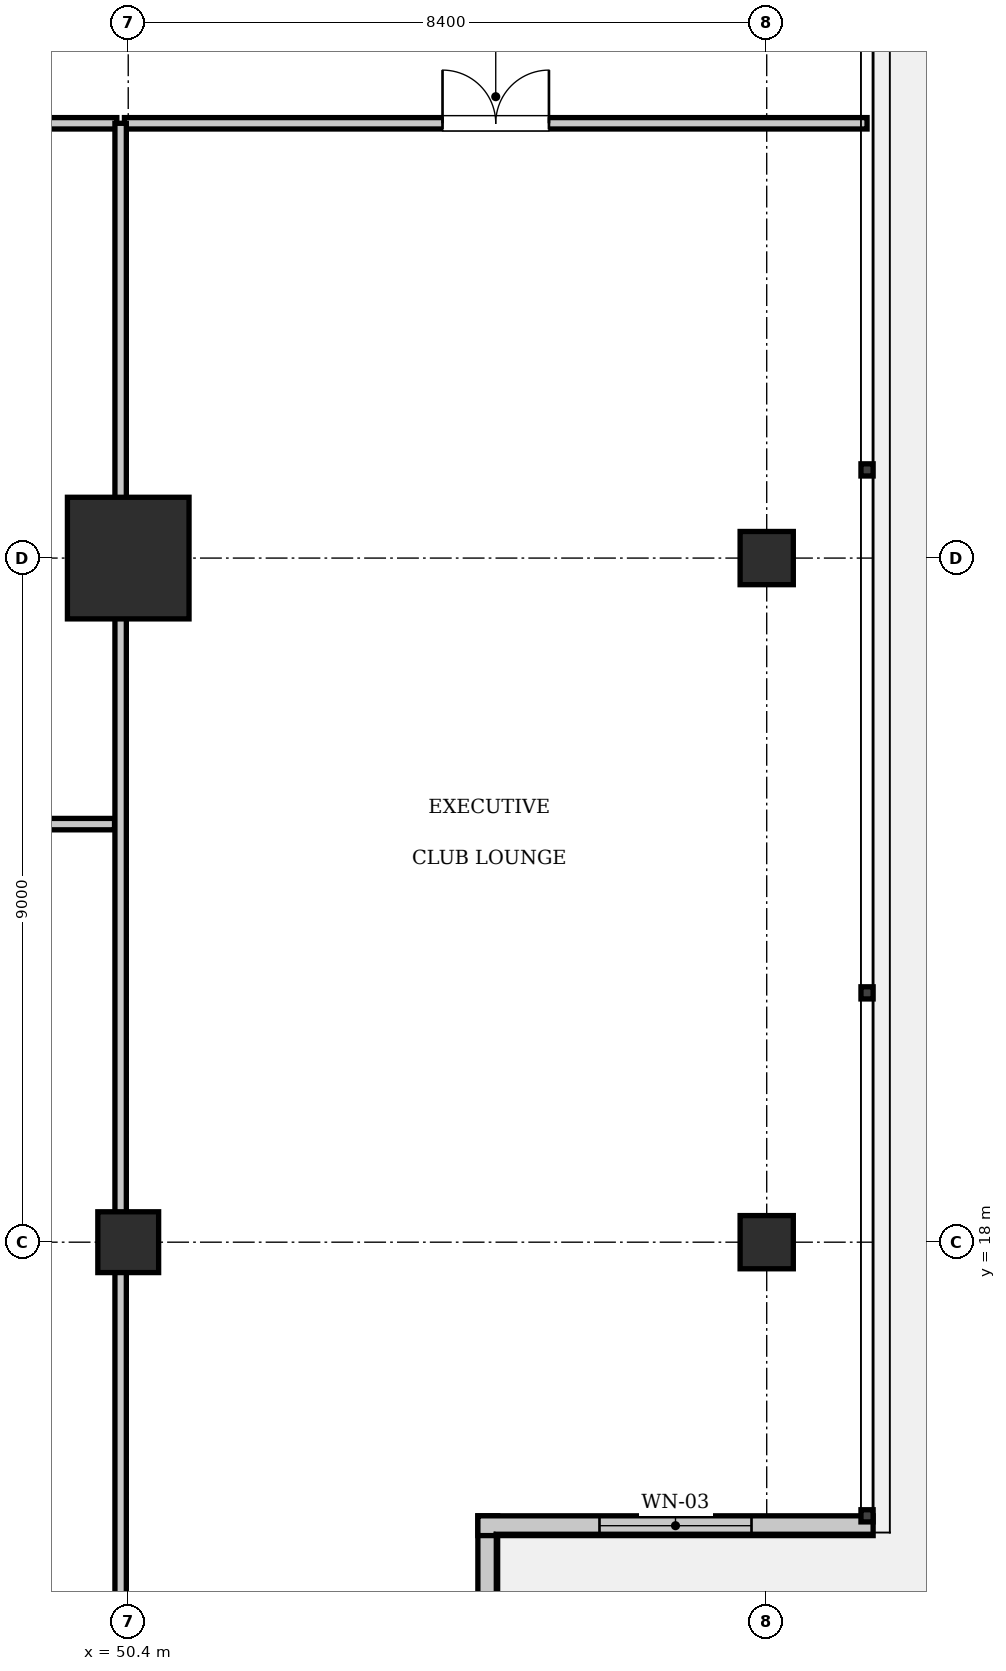
"""IFC4 building model, lengths in metres.
Left out: names, types, materials, properties, quantities, classifications, styles, units other than length and angle.
Written with IfcOpenShell. Run it as: python <this file> out.ifc"""

import sys

from ifc_helpers import new_model, si_unit, direction, frame, frame_2d, origin, origin_2d, place, context, subcontext, project, spatial, rectangle, extrude, element, fill, save


model = new_model("IFC4")
c1 = context("Model", 3, precision=1e-05, world=origin(), true_north=direction((0.0, 1.0)))
c2 = subcontext(c1, "Body", "Model", "MODEL_VIEW")
j1 = project(units=[si_unit("LENGTHUNIT", "METRE"), si_unit("PLANEANGLEUNIT", "RADIAN")], contexts=[c1])
p1 = place(None, origin())
s1 = spatial("IfcSite", under=j1, at=p1, CompositionType="ELEMENT")
p2 = place(p1, origin())
s2 = spatial("IfcBuilding", under=s1, at=p2, CompositionType="ELEMENT")
p3 = place(p2, frame((0.0, 0.0, 234.5)))
s3 = spatial("IfcBuildingStorey", under=s2, at=p3, CompositionType="ELEMENT", Elevation=234.5)
p4 = place(p3, frame((50.4, 27.0, 0.0), z_axis=(0.0, 0.0, 1.0), x_axis=(1.0, 0.0, 0.0)))
e1 = element("IfcColumn", 1, at=p4, inside=s3, PredefinedType="COLUMN", context=c2, shape_type="SweptSolid", body=[
    extrude(rectangle(XDim=1.6, YDim=1.6, at=origin_2d()), origin(), (0.0, 0.0, 1.0), 4.9),
])
p5 = place(p3, frame((50.4, 18.0, 0.0), z_axis=(0.0, 0.0, 1.0), x_axis=(1.0, 0.0, 0.0)))
e2 = element("IfcColumn", 2, at=p5, inside=s3, PredefinedType="COLUMN", context=c2, shape_type="SweptSolid", body=[
    extrude(rectangle(XDim=0.8, YDim=0.8, at=origin_2d()), origin(), (0.0, 0.0, 1.0), 4.9),
])
for number, where, z_axis, x_axis in (
    (3, (58.8, 18.0, 0.0), (0.0, 0.0, 1.0), (1.0, 0.0, 0.0)),
    (4, (58.8, 27.0, 0.0), (0.0, 0.0, 1.0), (1.0, 0.0, 0.0)),
):
    element("IfcColumn", number, at=place(p3, frame(where, z_axis=z_axis, x_axis=x_axis)), inside=s3, PredefinedType="COLUMN", context=c2, shape_type="SweptSolid", body=[
        extrude(rectangle(XDim=0.7, YDim=0.7, at=origin_2d()), origin(), (0.0, 0.0, 1.0), 4.9),
    ])
p6 = place(p3, frame((55.13, 14.4, 0.0), z_axis=(0.0, 0.0, 1.0), x_axis=(0.0, -1.0, 0.0)))
e5 = element("IfcWall", 5, at=p6, inside=s3, PredefinedType="SOLIDWALL", context=c2, shape_type="SweptSolid", body=[
    extrude(rectangle(XDim=5.2, YDim=0.26, at=frame_2d((2.6, 0.0))), origin(), (0.0, 0.0, 1.0), 4.66),
])
p7 = place(p3, frame((60.2, 14.27, 0.0), z_axis=(0.0, 0.0, 1.0), x_axis=(-1.0, 0.0, 0.0)))
e6 = element("IfcWall", 6, at=p7, inside=s3, PredefinedType="SOLIDWALL", context=c2, shape_type="SweptSolid", body=[
    extrude(rectangle(XDim=5.2, YDim=0.26, at=frame_2d((2.6, 0.0))), origin(), (0.0, 0.0, 1.0), 4.66),
])
p8 = place(p7, frame((1.6, 0.0, 0.9)))
e7 = element("IfcOpeningElement", 7, at=p8, cuts=e6, PredefinedType="OPENING", context=c2, shape_type="SweptSolid", body=[
    extrude(rectangle(XDim=2.0, YDim=2.2, at=frame_2d((1.0, 1.1))), frame((0.0, 0.14, 0.0), z_axis=(0.0, -1.0, 0.0), x_axis=(1.0, 0.0, 0.0)), (0.0, 0.0, 1.0), 0.28),
])
p9 = place(p3, frame((35.56, 23.5, 0.0), z_axis=(0.0, 0.0, 1.0), x_axis=(1.0, 0.0, 0.0)))
e8 = element("IfcWall", 8, at=p9, inside=s3, PredefinedType="PARTITIONING", context=c2, shape_type="SweptSolid", body=[
    extrude(rectangle(XDim=14.66, YDim=0.15, at=frame_2d((7.33, 0.0))), origin(), (0.0, 0.0, 1.0), 4.66),
])
p10 = place(p3, frame((35.56, 32.72, 0.0), z_axis=(0.0, 0.0, 1.0), x_axis=(1.0, 0.0, 0.0)))
e9 = element("IfcWall", 9, at=p10, inside=s3, PredefinedType="PARTITIONING", context=c2, shape_type="SweptSolid", body=[
    extrude(rectangle(XDim=14.69, YDim=0.15, at=frame_2d((7.345, 0.0))), origin(), (0.0, 0.0, 1.0), 4.66),
])
p11 = place(p10, frame((5.0, 0.0, 0.0)))
e10 = element("IfcOpeningElement", 10, at=p11, cuts=e9, PredefinedType="OPENING", context=c2, shape_type="SweptSolid", body=[
    extrude(rectangle(XDim=1.6, YDim=2.3, at=frame_2d((0.8, 1.15))), frame((0.0, 0.085, 0.0), z_axis=(0.0, -1.0, 0.0), x_axis=(1.0, 0.0, 0.0)), (0.0, 0.0, 1.0), 0.17),
])
p12 = place(p3, frame((50.35, 32.72, 0.0), z_axis=(0.0, 0.0, 1.0), x_axis=(1.0, 0.0, 0.0)))
e11 = element("IfcWall", 11, at=p12, inside=s3, PredefinedType="PARTITIONING", context=c2, shape_type="SweptSolid", body=[
    extrude(rectangle(XDim=9.77, YDim=0.15, at=frame_2d((4.885, 0.0))), origin(), (0.0, 0.0, 1.0), 4.66),
])
p13 = place(p12, frame((4.185, 0.0, 0.0)))
e12 = element("IfcOpeningElement", 12, at=p13, cuts=e11, PredefinedType="OPENING", context=c2, shape_type="SweptSolid", body=[
    extrude(rectangle(XDim=1.4, YDim=2.2, at=frame_2d((0.7, 1.1))), frame((0.0, 0.085, 0.0), z_axis=(0.0, -1.0, 0.0), x_axis=(1.0, 0.0, 0.0)), (0.0, 0.0, 1.0), 0.17),
])
p14 = place(p3, frame((50.3, 9.28, 0.0), z_axis=(0.0, 0.0, 1.0), x_axis=(0.0, 1.0, 0.0)))
e13 = element("IfcWall", 13, at=p14, inside=s3, PredefinedType="PARTITIONING", context=c2, shape_type="SweptSolid", body=[
    extrude(rectangle(XDim=23.44, YDim=0.15, at=frame_2d((11.72, 0.0))), origin(), (0.0, 0.0, 1.0), 4.127),
])
p15 = place(p8, origin())
e14 = element("IfcWindow", 14, at=p15, inside=s3, PartitioningType="SINGLE_PANEL", PredefinedType="WINDOW", context=c2, shape_type="SweptSolid", body=[
    extrude(rectangle(XDim=2.0, YDim=2.2, at=frame_2d((1.0, 1.1))), frame((0.0, 0.03, 0.0), z_axis=(0.0, -1.0, 0.0), x_axis=(1.0, 0.0, 0.0)), (0.0, 0.0, 1.0), 0.06),
])
fill(e7, e14)
p16 = place(p13, origin())
e15 = element("IfcDoor", 15, at=p16, inside=s3, OperationType="DOUBLE_DOOR_SINGLE_SWING", PredefinedType="DOOR", context=c2, shape_type="SweptSolid", body=[
    extrude(rectangle(XDim=1.4, YDim=2.2, at=frame_2d((0.7, 1.1))), frame((0.0, 0.025, 0.0), z_axis=(0.0, -1.0, 0.0), x_axis=(1.0, 0.0, 0.0)), (0.0, 0.0, 1.0), 0.05),
])
fill(e12, e15)
save(model, sys.argv[1])
